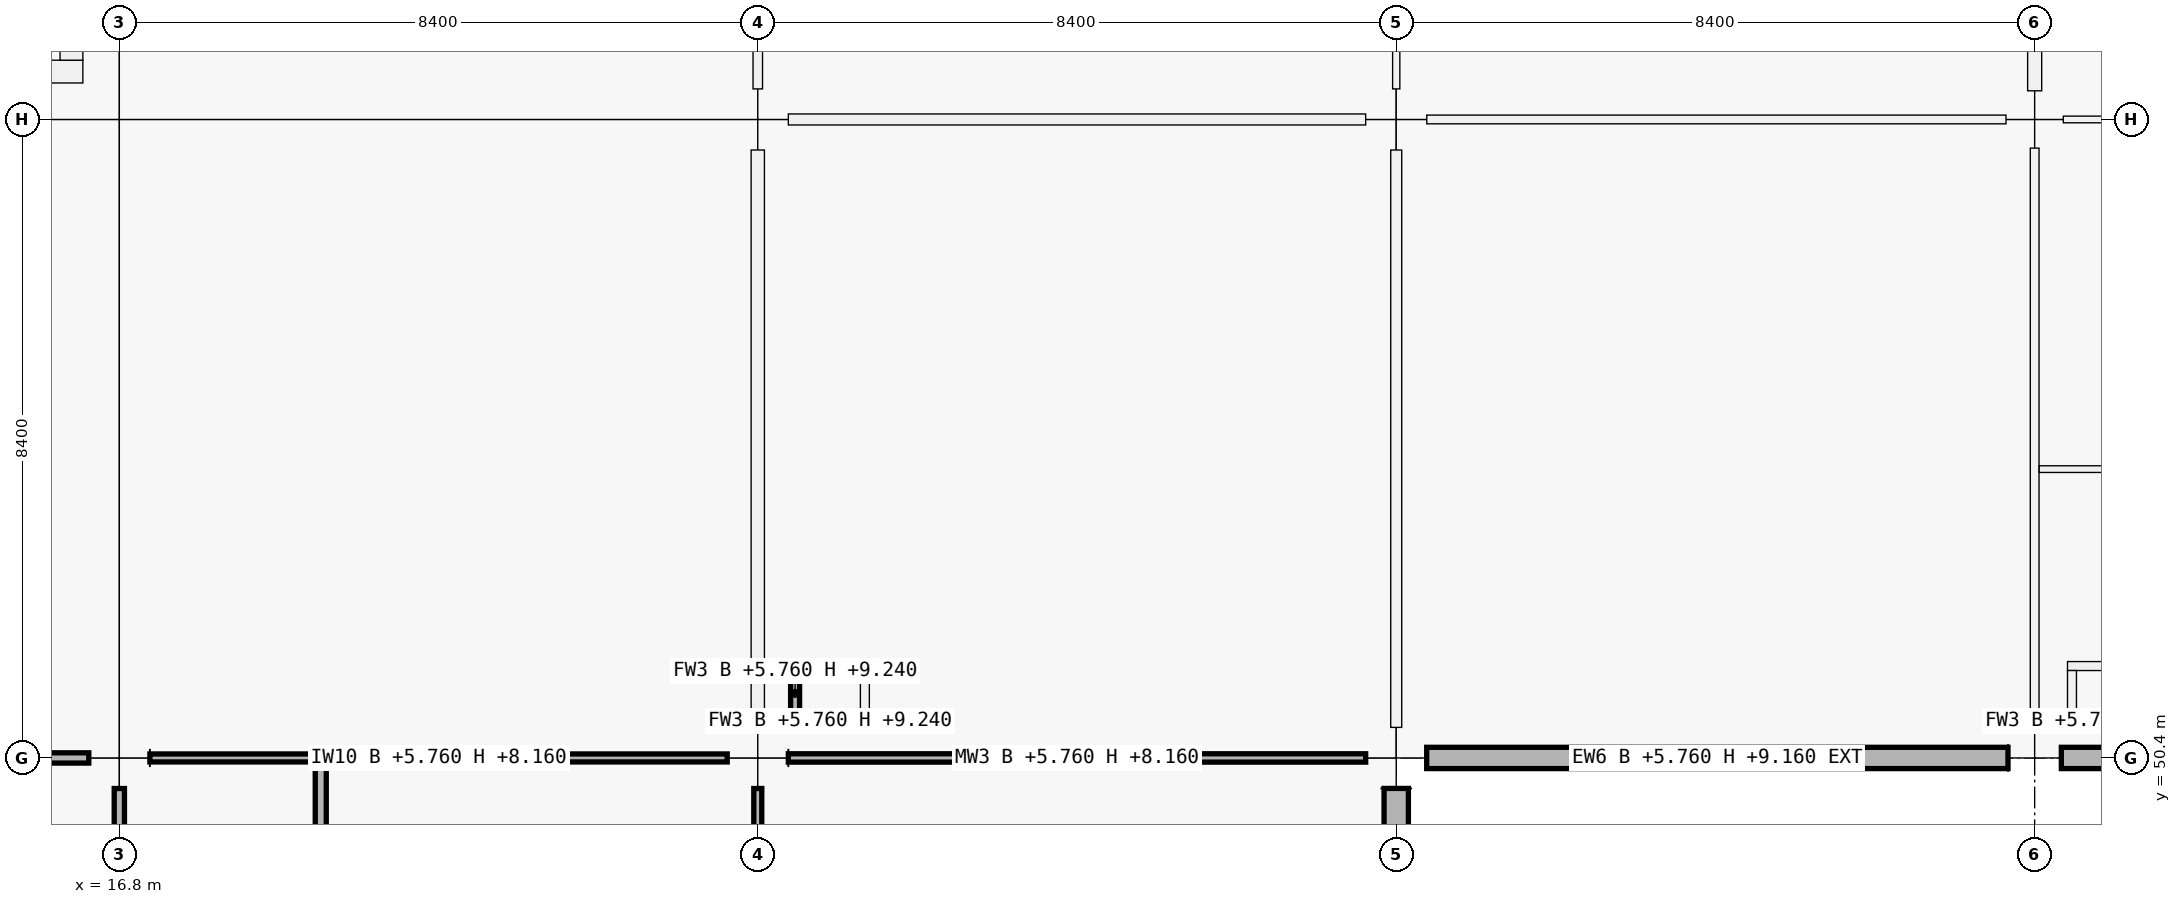
"""IFC4 building model, lengths in metres.
Left out: names, types, materials, properties, quantities, classifications, styles, units other than length and angle.
Written with IfcOpenShell. Run it as: python <this file> out.ifc"""

import sys

from ifc_helpers import new_model, si_unit, direction, frame, frame_2d, origin, origin_2d, place, context, subcontext, project, spatial, rectangle, extrude, element, fill, save


model = new_model("IFC4")
c1 = context("Model", 3, precision=1e-05, world=origin(), true_north=direction((0.0, 1.0)))
c2 = subcontext(c1, "Body", "Model", "MODEL_VIEW")
j1 = project(units=[si_unit("LENGTHUNIT", "METRE"), si_unit("PLANEANGLEUNIT", "RADIAN")], contexts=[c1])
p1 = place(None, origin())
s1 = spatial("IfcSite", under=j1, at=p1, CompositionType="ELEMENT")
p2 = place(p1, origin())
s2 = spatial("IfcBuilding", under=s1, at=p2, CompositionType="ELEMENT")
p3 = place(p2, frame((0.0, 0.0, 5.76)))
s3 = spatial("IfcBuildingStorey", under=s2, at=p3, CompositionType="ELEMENT", Elevation=5.76)
for number, where, z_axis, x_axis in (
    (1, (16.8, 50.4, 0.0), (0.0, 0.0, 1.0), (1.0, 0.0, 0.0)),
    (2, (16.8, 58.8, 0.0), (0.0, 0.0, 1.0), (1.0, 0.0, 0.0)),
    (3, (25.2, 50.4, 0.0), (0.0, 0.0, 1.0), (1.0, 0.0, 0.0)),
    (4, (25.2, 58.8, 0.0), (0.0, 0.0, 1.0), (1.0, 0.0, 0.0)),
    (5, (33.6, 50.4, 0.0), (0.0, 0.0, 1.0), (1.0, 0.0, 0.0)),
    (6, (33.6, 58.8, 0.0), (0.0, 0.0, 1.0), (1.0, 0.0, 0.0)),
):
    element("IfcColumn", number, at=place(p3, frame(where, z_axis=z_axis, x_axis=x_axis)), inside=s3, PredefinedType="COLUMN", context=c2, shape_type="SweptSolid", body=[
        extrude(rectangle(XDim=0.8, YDim=0.8, at=origin_2d()), origin(), (0.0, 0.0, 1.0), 4.5),
    ])
p4 = place(p3, frame((42.0, 50.4, 0.0), z_axis=(0.0, 0.0, 1.0), x_axis=(1.0, 0.0, 0.0)))
e7 = element("IfcColumn", 7, at=p4, inside=s3, PredefinedType="COLUMN", context=c2, shape_type="SweptSolid", body=[
    extrude(rectangle(XDim=0.7, YDim=0.7, at=origin_2d()), origin(), (0.0, 0.0, 1.0), 4.5),
])
p5 = place(p3, frame((42.0, 58.8, 0.0), z_axis=(0.0, 0.0, 1.0), x_axis=(1.0, 0.0, 0.0)))
e8 = element("IfcColumn", 8, at=p5, inside=s3, PredefinedType="COLUMN", context=c2, shape_type="SweptSolid", body=[
    extrude(rectangle(XDim=0.75, YDim=0.75, at=origin_2d()), origin(), (0.0, 0.0, 1.0), 4.5),
])
p6 = place(p3, frame((33.6, 49.999, 0.0), z_axis=(0.0, 0.0, 1.0), x_axis=(0.0, -1.0, 0.0)))
e9 = element("IfcWall", 9, at=p6, inside=s3, PredefinedType="SOLIDWALL", context=c2, shape_type="SweptSolid", body=[
    extrude(rectangle(XDim=7.598, YDim=0.32, at=frame_2d((3.799, 0.0))), origin(), (0.0, 0.0, 1.0), 3.4),
])
p7 = place(p6, frame((2.924, 0.0, 0.9)))
e10 = element("IfcOpeningElement", 10, at=p7, cuts=e9, PredefinedType="OPENING", context=c2, shape_type="SweptSolid", body=[
    extrude(rectangle(XDim=1.75, YDim=1.95, at=frame_2d((0.875, 0.975))), frame((0.0, 0.16, 0.0), z_axis=(0.0, -1.0, 0.0), x_axis=(1.0, 0.0, 0.0)), (0.0, 0.0, 1.0), 0.32),
])
p8 = place(p3, frame((41.649, 50.4, 0.0), z_axis=(0.0, 0.0, 1.0), x_axis=(-1.0, 0.0, 0.0)))
e11 = element("IfcWall", 11, at=p8, inside=s3, PredefinedType="SOLIDWALL", context=c2, shape_type="SweptSolid", body=[
    extrude(rectangle(XDim=7.648, YDim=0.28, at=frame_2d((3.824, 0.0))), origin(), (0.0, 0.0, 1.0), 3.4),
])
p9 = place(p3, frame((50.024, 50.4, 0.0), z_axis=(0.0, 0.0, 1.0), x_axis=(-1.0, 0.0, 0.0)))
e12 = element("IfcWall", 12, at=p9, inside=s3, PredefinedType="SOLIDWALL", context=c2, shape_type="SweptSolid", body=[
    extrude(rectangle(XDim=7.673, YDim=0.28, at=frame_2d((3.836, 0.0))), origin(), (0.0, 0.0, 1.0), 3.4),
])
p10 = place(p9, frame((2.462, 0.0, 0.9)))
e13 = element("IfcOpeningElement", 13, at=p10, cuts=e12, PredefinedType="OPENING", context=c2, shape_type="SweptSolid", body=[
    extrude(rectangle(XDim=2.75, YDim=1.6, at=frame_2d((1.375, 0.8))), frame((0.0, 0.14, 0.0), z_axis=(0.0, -1.0, 0.0), x_axis=(1.0, 0.0, 0.0)), (0.0, 0.0, 1.0), 0.28),
])
p11 = place(p3, frame((16.32, 59.43, 0.0), z_axis=(0.0, 0.0, 1.0), x_axis=(-1.0, 0.0, 0.0)))
e14 = element("IfcWall", 14, at=p11, inside=s3, PredefinedType="SHEAR", context=c2, shape_type="SweptSolid", body=[
    extrude(rectangle(XDim=7.44, YDim=0.3, at=frame_2d((3.72, 0.0))), origin(), (0.0, 0.0, 1.0), 4.5),
])
p12 = place(p11, frame((1.28, 0.0, 0.0)))
e15 = element("IfcOpeningElement", 15, at=p12, cuts=e14, PredefinedType="OPENING", context=c2, shape_type="SweptSolid", body=[
    extrude(rectangle(XDim=1.5, YDim=2.15, at=frame_2d((0.75, 1.075))), frame((0.0, 0.15, 0.0), z_axis=(0.0, -1.0, 0.0), x_axis=(1.0, 0.0, 0.0)), (0.0, 0.0, 1.0), 0.3),
])
p13 = place(p3, frame((16.17, 66.42, 0.0), z_axis=(0.0, 0.0, 1.0), x_axis=(0.0, -1.0, 0.0)))
e16 = element("IfcWall", 16, at=p13, inside=s3, PredefinedType="SHEAR", context=c2, shape_type="SweptSolid", body=[
    extrude(rectangle(XDim=6.84, YDim=0.3, at=frame_2d((3.42, 0.0))), origin(), (0.0, 0.0, 1.0), 4.5),
])
for number, where, z_axis, x_axis in (
    (17, (25.632, 50.891, 0.0), (0.0, 0.0, 1.0), (1.0, 0.0, 0.0)),
    (18, (25.632, 51.609, 0.0), (0.0, 0.0, 1.0), (1.0, 0.0, 0.0)),
):
    element("IfcWall", number, at=place(p3, frame(where, z_axis=z_axis, x_axis=x_axis)), inside=s3, PredefinedType="PARTITIONING", context=c2, shape_type="SweptSolid", body=[
        extrude(rectangle(XDim=1.036, YDim=0.118, at=frame_2d((0.518, 0.0))), origin(), (0.0, 0.0, 1.0), 3.48),
    ])
for number, where, z_axis, x_axis in (
    (19, (25.691, 50.95, 0.0), (0.0, 0.0, 1.0), (0.0, 1.0, 0.0)),
    (20, (26.609, 50.95, 0.0), (0.0, 0.0, 1.0), (0.0, 1.0, 0.0)),
):
    element("IfcWall", number, at=place(p3, frame(where, z_axis=z_axis, x_axis=x_axis)), inside=s3, PredefinedType="PARTITIONING", context=c2, shape_type="SweptSolid", body=[
        extrude(rectangle(XDim=0.6, YDim=0.118, at=frame_2d((0.3, 0.0))), origin(), (0.0, 0.0, 1.0), 3.48),
    ])
for number, where, z_axis, x_axis in (
    (21, (42.432, 50.891, 0.0), (0.0, 0.0, 1.0), (1.0, 0.0, 0.0)),
    (22, (42.432, 51.609, 0.0), (0.0, 0.0, 1.0), (1.0, 0.0, 0.0)),
):
    element("IfcWall", number, at=place(p3, frame(where, z_axis=z_axis, x_axis=x_axis)), inside=s3, PredefinedType="PARTITIONING", context=c2, shape_type="SweptSolid", body=[
        extrude(rectangle(XDim=1.036, YDim=0.118, at=frame_2d((0.518, 0.0))), origin(), (0.0, 0.0, 1.0), 3.48),
    ])
p14 = place(p3, frame((42.491, 50.95, 0.0), z_axis=(0.0, 0.0, 1.0), x_axis=(0.0, 1.0, 0.0)))
e23 = element("IfcWall", 23, at=p14, inside=s3, PredefinedType="PARTITIONING", context=c2, shape_type="SweptSolid", body=[
    extrude(rectangle(XDim=0.6, YDim=0.118, at=frame_2d((0.3, 0.0))), origin(), (0.0, 0.0, 1.0), 3.48),
])
p15 = place(p3, frame((8.802, 50.4, 0.0), z_axis=(0.0, 0.0, 1.0), x_axis=(1.0, 0.0, 0.0)))
e24 = element("IfcWall", 24, at=p15, inside=s3, PredefinedType="PARTITIONING", context=c2, shape_type="SweptSolid", body=[
    extrude(rectangle(XDim=7.596, YDim=0.135, at=frame_2d((3.798, 0.0))), origin(), (0.0, 0.0, 1.0), 2.4),
])
p16 = place(p15, frame((3.328, 0.0, 0.0)))
e25 = element("IfcOpeningElement", 25, at=p16, cuts=e24, PredefinedType="OPENING", context=c2, shape_type="SweptSolid", body=[
    extrude(rectangle(XDim=0.94, YDim=2.15, at=frame_2d((0.47, 1.075))), frame((0.0, 0.067, 0.0), z_axis=(0.0, -1.0, 0.0), x_axis=(1.0, 0.0, 0.0)), (0.0, 0.0, 1.0), 0.135),
])
p17 = place(p3, frame((17.202, 50.4, 0.0), z_axis=(0.0, 0.0, 1.0), x_axis=(1.0, 0.0, 0.0)))
e26 = element("IfcWall", 26, at=p17, inside=s3, PredefinedType="PARTITIONING", context=c2, shape_type="SweptSolid", body=[
    extrude(rectangle(XDim=7.596, YDim=0.105, at=frame_2d((3.798, 0.0))), origin(), (0.0, 0.0, 1.0), 2.4),
])
p18 = place(p17, frame((0.583, 0.0, 0.0)))
e27 = element("IfcOpeningElement", 27, at=p18, cuts=e26, PredefinedType="OPENING", context=c2, shape_type="SweptSolid", body=[
    extrude(rectangle(XDim=0.96, YDim=2.1, at=frame_2d((0.48, 1.05))), frame((0.0, 0.052, 0.0), z_axis=(0.0, -1.0, 0.0), x_axis=(1.0, 0.0, 0.0)), (0.0, 0.0, 1.0), 0.105),
])
p19 = place(p17, frame((4.523, 0.0, 0.0)))
e28 = element("IfcOpeningElement", 28, at=p19, cuts=e26, PredefinedType="OPENING", context=c2, shape_type="SweptSolid", body=[
    extrude(rectangle(XDim=0.92, YDim=2.1, at=frame_2d((0.46, 1.05))), frame((0.0, 0.052, 0.0), z_axis=(0.0, -1.0, 0.0), x_axis=(1.0, 0.0, 0.0)), (0.0, 0.0, 1.0), 0.105),
])
p20 = place(p3, frame((25.602, 50.4, 0.0), z_axis=(0.0, 0.0, 1.0), x_axis=(1.0, 0.0, 0.0)))
e29 = element("IfcWall", 29, at=p20, inside=s3, PredefinedType="MOVABLE", context=c2, shape_type="SweptSolid", body=[
    extrude(rectangle(XDim=7.596, YDim=0.11, at=frame_2d((3.798, 0.0))), origin(), (0.0, 0.0, 1.0), 2.4),
])
p21 = place(p20, frame((3.258, 0.0, 0.0)))
e30 = element("IfcOpeningElement", 30, at=p21, cuts=e29, PredefinedType="OPENING", context=c2, shape_type="SweptSolid", body=[
    extrude(rectangle(XDim=1.08, YDim=2.22, at=frame_2d((0.54, 1.11))), frame((0.0, 0.055, 0.0), z_axis=(0.0, -1.0, 0.0), x_axis=(1.0, 0.0, 0.0)), (0.0, 0.0, 1.0), 0.11),
])
p22 = place(p3, frame((25.602, 58.8, 0.0), z_axis=(0.0, 0.0, 1.0), x_axis=(1.0, 0.0, 0.0)))
e31 = element("IfcWall", 31, at=p22, inside=s3, PredefinedType="PARTITIONING", context=c2, shape_type="SweptSolid", body=[
    extrude(rectangle(XDim=7.596, YDim=0.145, at=frame_2d((3.798, 0.0))), origin(), (0.0, 0.0, 1.0), 2.4),
])
p23 = place(p22, frame((3.268, 0.0, 0.0)))
e32 = element("IfcOpeningElement", 32, at=p23, cuts=e31, PredefinedType="OPENING", context=c2, shape_type="SweptSolid", body=[
    extrude(rectangle(XDim=1.06, YDim=2.22, at=frame_2d((0.53, 1.11))), frame((0.0, 0.073, 0.0), z_axis=(0.0, -1.0, 0.0), x_axis=(1.0, 0.0, 0.0)), (0.0, 0.0, 1.0), 0.145),
])
p24 = place(p3, frame((34.002, 58.8, 0.0), z_axis=(0.0, 0.0, 1.0), x_axis=(1.0, 0.0, 0.0)))
e33 = element("IfcWall", 33, at=p24, inside=s3, PredefinedType="PARTITIONING", context=c2, shape_type="SweptSolid", body=[
    extrude(rectangle(XDim=7.621, YDim=0.115, at=frame_2d((3.811, 0.0))), origin(), (0.0, 0.0, 1.0), 2.4),
])
p25 = place(p24, frame((3.28, 0.0, 0.0)))
e34 = element("IfcOpeningElement", 34, at=p25, cuts=e33, PredefinedType="OPENING", context=c2, shape_type="SweptSolid", body=[
    extrude(rectangle(XDim=1.06, YDim=2.22, at=frame_2d((0.53, 1.11))), frame((0.0, 0.058, 0.0), z_axis=(0.0, -1.0, 0.0), x_axis=(1.0, 0.0, 0.0)), (0.0, 0.0, 1.0), 0.115),
])
p26 = place(p3, frame((42.377, 58.8, 0.0), z_axis=(0.0, 0.0, 1.0), x_axis=(1.0, 0.0, 0.0)))
e35 = element("IfcWall", 35, at=p26, inside=s3, PredefinedType="PARTITIONING", context=c2, shape_type="SweptSolid", body=[
    extrude(rectangle(XDim=7.671, YDim=0.088, at=frame_2d((3.835, 0.0))), origin(), (0.0, 0.0, 1.0), 2.4),
])
p27 = place(p3, frame((16.8, 42.402, 0.0), z_axis=(0.0, 0.0, 1.0), x_axis=(0.0, 1.0, 0.0)))
e36 = element("IfcWall", 36, at=p27, inside=s3, PredefinedType="PARTITIONING", context=c2, shape_type="SweptSolid", body=[
    extrude(rectangle(XDim=7.596, YDim=0.135, at=frame_2d((3.798, 0.0))), origin(), (0.0, 0.0, 1.0), 2.4),
])
p28 = place(p3, frame((25.2, 42.402, 0.0), z_axis=(0.0, 0.0, 1.0), x_axis=(0.0, 1.0, 0.0)))
e37 = element("IfcWall", 37, at=p28, inside=s3, PredefinedType="PARTITIONING", context=c2, shape_type="SweptSolid", body=[
    extrude(rectangle(XDim=7.596, YDim=0.105, at=frame_2d((3.798, 0.0))), origin(), (0.0, 0.0, 1.0), 2.4),
])
p29 = place(p3, frame((25.2, 50.802, 0.0), z_axis=(0.0, 0.0, 1.0), x_axis=(0.0, 1.0, 0.0)))
e38 = element("IfcWall", 38, at=p29, inside=s3, PredefinedType="PARTITIONING", context=c2, shape_type="SweptSolid", body=[
    extrude(rectangle(XDim=7.596, YDim=0.175, at=frame_2d((3.798, 0.0))), origin(), (0.0, 0.0, 1.0), 2.4),
])
p30 = place(p29, frame((3.288, 0.0, 0.0)))
e39 = element("IfcOpeningElement", 39, at=p30, cuts=e38, PredefinedType="OPENING", context=c2, shape_type="SweptSolid", body=[
    extrude(rectangle(XDim=1.02, YDim=2.2, at=frame_2d((0.51, 1.1))), frame((0.0, 0.087, 0.0), z_axis=(0.0, -1.0, 0.0), x_axis=(1.0, 0.0, 0.0)), (0.0, 0.0, 1.0), 0.175),
])
p31 = place(p3, frame((25.2, 59.202, 0.0), z_axis=(0.0, 0.0, 1.0), x_axis=(0.0, 1.0, 0.0)))
e40 = element("IfcWall", 40, at=p31, inside=s3, PredefinedType="PARTITIONING", context=c2, shape_type="SweptSolid", body=[
    extrude(rectangle(XDim=7.596, YDim=0.125, at=frame_2d((3.798, 0.0))), origin(), (0.0, 0.0, 1.0), 2.4),
])
p32 = place(p31, frame((3.298, 0.0, 0.0)))
e41 = element("IfcOpeningElement", 41, at=p32, cuts=e40, PredefinedType="OPENING", context=c2, shape_type="SweptSolid", body=[
    extrude(rectangle(XDim=1.0, YDim=2.2, at=frame_2d((0.5, 1.1))), frame((0.0, 0.062, 0.0), z_axis=(0.0, -1.0, 0.0), x_axis=(1.0, 0.0, 0.0)), (0.0, 0.0, 1.0), 0.125),
])
p33 = place(p3, frame((33.6, 50.802, 0.0), z_axis=(0.0, 0.0, 1.0), x_axis=(0.0, 1.0, 0.0)))
e42 = element("IfcWall", 42, at=p33, inside=s3, PredefinedType="PARTITIONING", context=c2, shape_type="SweptSolid", body=[
    extrude(rectangle(XDim=7.596, YDim=0.145, at=frame_2d((3.798, 0.0))), origin(), (0.0, 0.0, 1.0), 2.4),
])
p34 = place(p33, frame((3.318, 0.0, 0.0)))
e43 = element("IfcOpeningElement", 43, at=p34, cuts=e42, PredefinedType="OPENING", context=c2, shape_type="SweptSolid", body=[
    extrude(rectangle(XDim=0.96, YDim=2.18, at=frame_2d((0.48, 1.09))), frame((0.0, 0.073, 0.0), z_axis=(0.0, -1.0, 0.0), x_axis=(1.0, 0.0, 0.0)), (0.0, 0.0, 1.0), 0.145),
])
p35 = place(p3, frame((33.6, 59.202, 0.0), z_axis=(0.0, 0.0, 1.0), x_axis=(0.0, 1.0, 0.0)))
e44 = element("IfcWall", 44, at=p35, inside=s3, PredefinedType="PARTITIONING", context=c2, shape_type="SweptSolid", body=[
    extrude(rectangle(XDim=7.596, YDim=0.095, at=frame_2d((3.798, 0.0))), origin(), (0.0, 0.0, 1.0), 2.4),
])
p36 = place(p35, frame((3.308, 0.0, 0.0)))
e45 = element("IfcOpeningElement", 45, at=p36, cuts=e44, PredefinedType="OPENING", context=c2, shape_type="SweptSolid", body=[
    extrude(rectangle(XDim=0.98, YDim=2.18, at=frame_2d((0.49, 1.09))), frame((0.0, 0.047, 0.0), z_axis=(0.0, -1.0, 0.0), x_axis=(1.0, 0.0, 0.0)), (0.0, 0.0, 1.0), 0.095),
])
p37 = place(p3, frame((42.0, 50.752, 0.0), z_axis=(0.0, 0.0, 1.0), x_axis=(0.0, 1.0, 0.0)))
e46 = element("IfcWall", 46, at=p37, inside=s3, PredefinedType="PARTITIONING", context=c2, shape_type="SweptSolid", body=[
    extrude(rectangle(XDim=7.671, YDim=0.115, at=frame_2d((3.835, 0.0))), origin(), (0.0, 0.0, 1.0), 2.4),
])
p38 = place(p3, frame((42.0, 59.177, 0.0), z_axis=(0.0, 0.0, 1.0), x_axis=(0.0, 1.0, 0.0)))
e47 = element("IfcWall", 47, at=p38, inside=s3, PredefinedType="PARTITIONING", context=c2, shape_type="SweptSolid", body=[
    extrude(rectangle(XDim=7.621, YDim=0.185, at=frame_2d((3.811, 0.0))), origin(), (0.0, 0.0, 1.0), 2.4),
])
p39 = place(p3, frame((19.45, 42.08, 0.0), z_axis=(0.0, 0.0, 1.0), x_axis=(0.0, 1.0, 0.0)))
e48 = element("IfcWall", 48, at=p39, inside=s3, PredefinedType="PARTITIONING", context=c2, shape_type="SweptSolid", body=[
    extrude(rectangle(XDim=8.266, YDim=0.145, at=frame_2d((4.133, 0.0))), origin(), (0.0, 0.0, 1.0), 2.4),
])
p40 = place(p3, frame((42.06, 54.2, 0.0), z_axis=(0.0, 0.0, 1.0), x_axis=(1.0, 0.0, 0.0)))
e49 = element("IfcWall", 49, at=p40, inside=s3, PredefinedType="PARTITIONING", context=c2, shape_type="SweptSolid", body=[
    extrude(rectangle(XDim=8.294, YDim=0.088, at=frame_2d((4.147, 0.0))), origin(), (0.0, 0.0, 1.0), 2.4),
])
p41 = place(p18, origin())
e50 = element("IfcDoor", 50, at=p41, inside=s3, OperationType="SINGLE_SWING_RIGHT", PredefinedType="DOOR", context=c2, shape_type="SweptSolid", body=[
    extrude(rectangle(XDim=0.96, YDim=2.1, at=frame_2d((0.48, 1.05))), frame((0.0, 0.025, 0.0), z_axis=(0.0, -1.0, 0.0), x_axis=(1.0, 0.0, 0.0)), (0.0, 0.0, 1.0), 0.05),
])
fill(e27, e50)
p42 = place(p19, origin())
e51 = element("IfcDoor", 51, at=p42, inside=s3, OperationType="SINGLE_SWING_LEFT", PredefinedType="DOOR", context=c2, shape_type="SweptSolid", body=[
    extrude(rectangle(XDim=0.92, YDim=2.1, at=frame_2d((0.46, 1.05))), frame((0.0, 0.025, 0.0), z_axis=(0.0, -1.0, 0.0), x_axis=(1.0, 0.0, 0.0)), (0.0, 0.0, 1.0), 0.05),
])
fill(e28, e51)
p43 = place(p30, origin())
e52 = element("IfcDoor", 52, at=p43, inside=s3, OperationType="SINGLE_SWING_LEFT", PredefinedType="DOOR", context=c2, shape_type="SweptSolid", body=[
    extrude(rectangle(XDim=1.02, YDim=2.2, at=frame_2d((0.51, 1.1))), frame((0.0, 0.025, 0.0), z_axis=(0.0, -1.0, 0.0), x_axis=(1.0, 0.0, 0.0)), (0.0, 0.0, 1.0), 0.05),
])
fill(e39, e52)
p44 = place(p25, origin())
e53 = element("IfcDoor", 53, at=p44, inside=s3, OperationType="SINGLE_SWING_LEFT", PredefinedType="DOOR", context=c2, shape_type="SweptSolid", body=[
    extrude(rectangle(XDim=1.06, YDim=2.22, at=frame_2d((0.53, 1.11))), frame((0.0, 0.025, 0.0), z_axis=(0.0, -1.0, 0.0), x_axis=(1.0, 0.0, 0.0)), (0.0, 0.0, 1.0), 0.05),
])
fill(e34, e53)
p45 = place(p34, origin())
e54 = element("IfcDoor", 54, at=p45, inside=s3, OperationType="SINGLE_SWING_RIGHT", PredefinedType="DOOR", context=c2, shape_type="SweptSolid", body=[
    extrude(rectangle(XDim=0.96, YDim=2.18, at=frame_2d((0.48, 1.09))), frame((0.0, 0.025, 0.0), z_axis=(0.0, -1.0, 0.0), x_axis=(1.0, 0.0, 0.0)), (0.0, 0.0, 1.0), 0.05),
])
fill(e43, e54)
p46 = place(p21, origin())
e55 = element("IfcDoor", 55, at=p46, inside=s3, OperationType="SINGLE_SWING_LEFT", PredefinedType="DOOR", context=c2, shape_type="SweptSolid", body=[
    extrude(rectangle(XDim=1.08, YDim=2.22, at=frame_2d((0.54, 1.11))), frame((0.0, 0.025, 0.0), z_axis=(0.0, -1.0, 0.0), x_axis=(1.0, 0.0, 0.0)), (0.0, 0.0, 1.0), 0.05),
])
fill(e30, e55)
p47 = place(p23, origin())
e56 = element("IfcDoor", 56, at=p47, inside=s3, OperationType="SINGLE_SWING_RIGHT", PredefinedType="DOOR", context=c2, shape_type="SweptSolid", body=[
    extrude(rectangle(XDim=1.06, YDim=2.22, at=frame_2d((0.53, 1.11))), frame((0.0, 0.025, 0.0), z_axis=(0.0, -1.0, 0.0), x_axis=(1.0, 0.0, 0.0)), (0.0, 0.0, 1.0), 0.05),
])
fill(e32, e56)
save(model, sys.argv[1])
